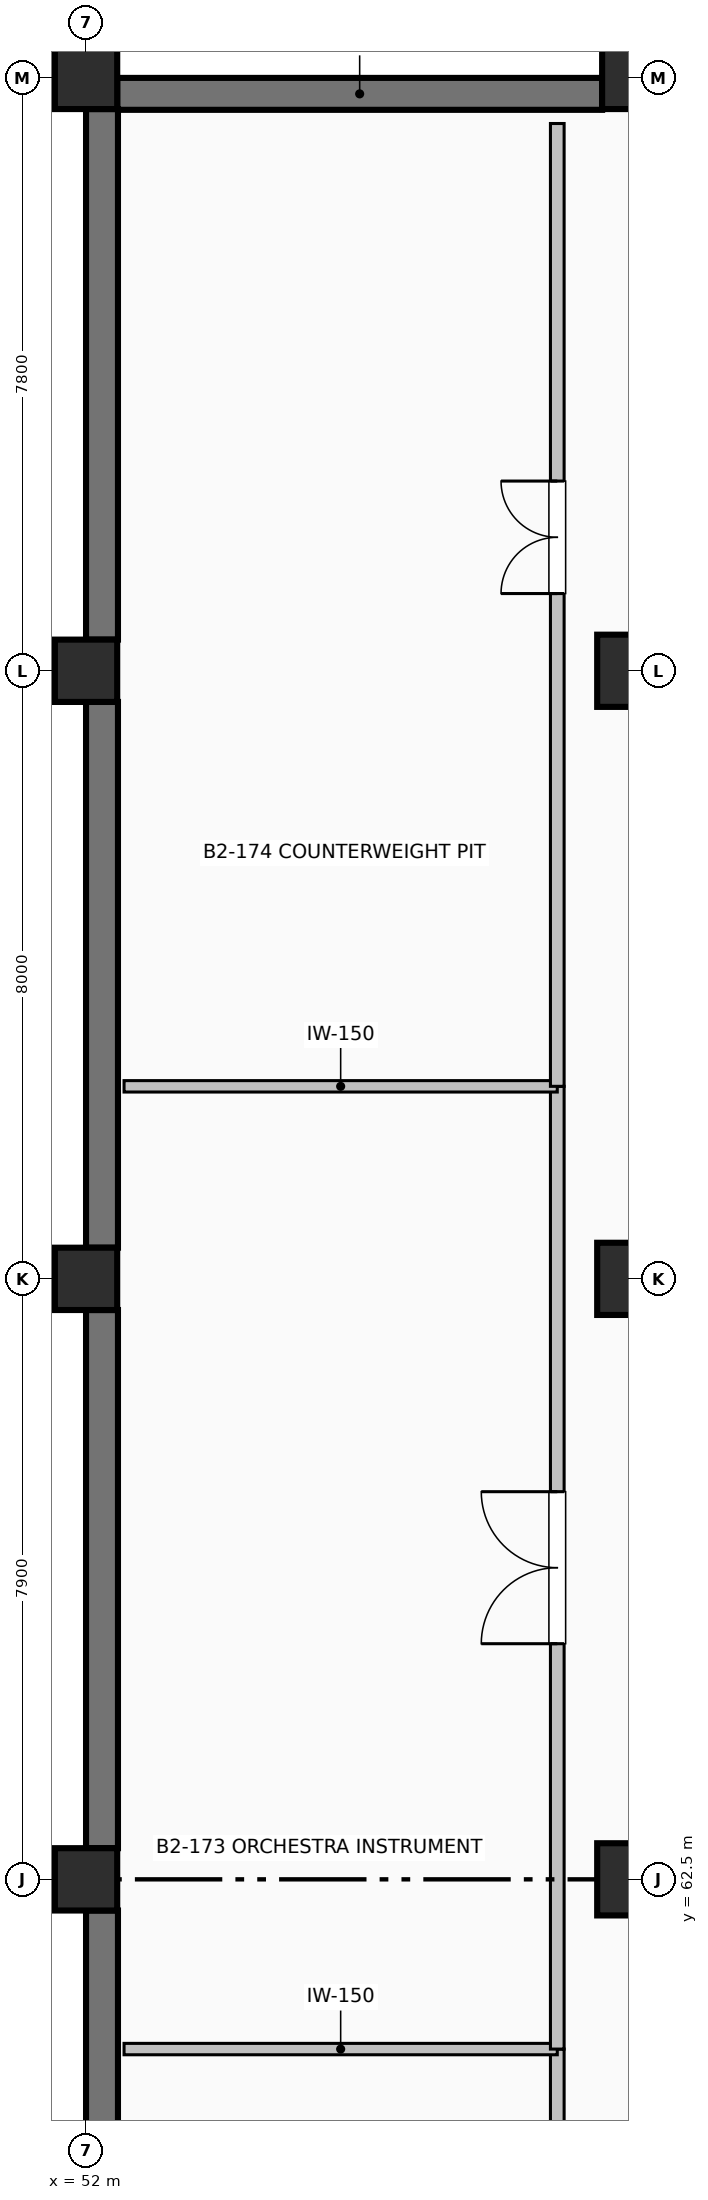
"""IFC4 building model, lengths in metres.
Left out: names, types, materials, properties, quantities, classifications, styles, units other than length and angle.
Written with IfcOpenShell. Run it as: python <this file> out.ifc"""

import sys

from ifc_helpers import new_model, si_unit, direction, frame, frame_2d, origin, origin_2d, place, context, subcontext, project, spatial, rectangle, extrude, element, fill, save


model = new_model("IFC4")
c1 = context("Model", 3, precision=1e-05, world=origin(), true_north=direction((0.0, 1.0)))
c2 = subcontext(c1, "Body", "Model", "MODEL_VIEW")
j1 = project(units=[si_unit("LENGTHUNIT", "METRE"), si_unit("PLANEANGLEUNIT", "RADIAN")], contexts=[c1])
p1 = place(None, origin())
s1 = spatial("IfcSite", under=j1, at=p1, CompositionType="ELEMENT")
p2 = place(p1, origin())
s2 = spatial("IfcBuilding", under=s1, at=p2, CompositionType="ELEMENT")
p3 = place(p2, frame((0.0, 0.0, -9.6)))
s3 = spatial("IfcBuildingStorey", under=s2, at=p3, CompositionType="ELEMENT", Elevation=-9.6)
for number, where, z_axis, x_axis in (
    (1, (52.0, 62.5, 0.0), (0.0, 0.0, 1.0), (1.0, 0.0, 0.0)),
    (2, (52.0, 70.4, 0.0), (0.0, 0.0, 1.0), (1.0, 0.0, 0.0)),
    (3, (52.0, 78.4, 0.0), (0.0, 0.0, 1.0), (1.0, 0.0, 0.0)),
    (4, (52.0, 86.2, 0.0), (0.0, 0.0, 1.0), (1.0, 0.0, 0.0)),
):
    element("IfcColumn", number, at=place(p3, frame(where, z_axis=z_axis, x_axis=x_axis)), inside=s3, PredefinedType="COLUMN", context=c2, shape_type="SweptSolid", body=[
        extrude(rectangle(XDim=0.82, YDim=0.82, at=origin_2d()), origin(), (0.0, 0.0, 1.0), 4.8),
    ])
for number, where, z_axis, x_axis in (
    (5, (59.2, 62.5, 0.0), (0.0, 0.0, 1.0), (1.0, 0.0, 0.0)),
    (6, (59.2, 70.4, 0.0), (0.0, 0.0, 1.0), (1.0, 0.0, 0.0)),
    (7, (59.2, 78.4, 0.0), (0.0, 0.0, 1.0), (1.0, 0.0, 0.0)),
):
    element("IfcColumn", number, at=place(p3, frame(where, z_axis=z_axis, x_axis=x_axis)), inside=s3, PredefinedType="COLUMN", context=c2, shape_type="SweptSolid", body=[
        extrude(rectangle(XDim=0.95, YDim=0.95, at=origin_2d()), origin(), (0.0, 0.0, 1.0), 4.8),
    ])
p4 = place(p3, frame((59.2, 86.2, 0.0), z_axis=(0.0, 0.0, 1.0), x_axis=(1.0, 0.0, 0.0)))
e8 = element("IfcColumn", 8, at=p4, inside=s3, PredefinedType="COLUMN", context=c2, shape_type="SweptSolid", body=[
    extrude(rectangle(XDim=0.82, YDim=0.82, at=origin_2d()), origin(), (0.0, 0.0, 1.0), 4.8),
])
p5 = place(p3, frame((52.41, 85.99, 0.0), z_axis=(0.0, 0.0, 1.0), x_axis=(1.0, 0.0, 0.0)))
e9 = element("IfcWall", 9, at=p5, inside=s3, PredefinedType="SHEAR", context=c2, shape_type="SweptSolid", body=[
    extrude(rectangle(XDim=6.38, YDim=0.42, at=frame_2d((3.19, 0.0))), origin(), (0.0, 0.0, 1.0), 4.5),
])
for number, where, z_axis, x_axis in (
    (10, (52.21, 55.01, 0.0), (0.0, 0.0, 1.0), (0.0, 1.0, 0.0)),
    (11, (52.21, 62.91, 0.0), (0.0, 0.0, 1.0), (0.0, 1.0, 0.0)),
):
    element("IfcWall", number, at=place(p3, frame(where, z_axis=z_axis, x_axis=x_axis)), inside=s3, PredefinedType="SHEAR", context=c2, shape_type="SweptSolid", body=[
        extrude(rectangle(XDim=7.08, YDim=0.42, at=frame_2d((3.54, 0.0))), origin(), (0.0, 0.0, 1.0), 4.5),
    ])
p6 = place(p3, frame((52.21, 70.81, 0.0), z_axis=(0.0, 0.0, 1.0), x_axis=(0.0, 1.0, 0.0)))
e12 = element("IfcWall", 12, at=p6, inside=s3, PredefinedType="SHEAR", context=c2, shape_type="SweptSolid", body=[
    extrude(rectangle(XDim=7.18, YDim=0.42, at=frame_2d((3.59, 0.0))), origin(), (0.0, 0.0, 1.0), 4.5),
])
p7 = place(p3, frame((52.21, 78.81, 0.0), z_axis=(0.0, 0.0, 1.0), x_axis=(0.0, 1.0, 0.0)))
e13 = element("IfcWall", 13, at=p7, inside=s3, PredefinedType="SHEAR", context=c2, shape_type="SweptSolid", body=[
    extrude(rectangle(XDim=6.98, YDim=0.42, at=frame_2d((3.49, 0.0))), origin(), (0.0, 0.0, 1.0), 4.5),
])
p8 = place(p3, frame((58.2, 47.6, 0.0), z_axis=(0.0, 0.0, 1.0), x_axis=(0.0, 1.0, 0.0)))
e14 = element("IfcWall", 14, at=p8, inside=s3, PredefinedType="PARTITIONING", context=c2, shape_type="SweptSolid", body=[
    extrude(rectangle(XDim=12.667, YDim=0.18, at=frame_2d((6.333, 0.0))), origin(), (0.0, 0.0, 1.0), 4.492),
])
p9 = place(p8, frame((4.633, 0.0, 0.0)))
e15 = element("IfcOpeningElement", 15, at=p9, cuts=e14, PredefinedType="OPENING", context=c2, shape_type="SweptSolid", body=[
    extrude(rectangle(XDim=1.65, YDim=2.2, at=frame_2d((0.825, 1.1))), frame((0.0, 0.1, 0.0), z_axis=(0.0, -1.0, 0.0), x_axis=(1.0, 0.0, 0.0)), (0.0, 0.0, 1.0), 0.2),
])
p10 = place(p3, frame((52.5, 60.267, 0.0), z_axis=(0.0, 0.0, 1.0), x_axis=(1.0, 0.0, 0.0)))
e16 = element("IfcWall", 16, at=p10, inside=s3, PredefinedType="PARTITIONING", context=c2, shape_type="SweptSolid", body=[
    extrude(rectangle(XDim=5.7, YDim=0.15, at=frame_2d((2.85, 0.0))), origin(), (0.0, 0.0, 1.0), 4.492),
])
p11 = place(p3, frame((58.2, 60.267, 0.0), z_axis=(0.0, 0.0, 1.0), x_axis=(0.0, 1.0, 0.0)))
e17 = element("IfcWall", 17, at=p11, inside=s3, PredefinedType="PARTITIONING", context=c2, shape_type="SweptSolid", body=[
    extrude(rectangle(XDim=12.666, YDim=0.18, at=frame_2d((6.333, 0.0))), origin(), (0.0, 0.0, 1.0), 4.492),
])
p12 = place(p11, frame((5.333, 0.0, 0.0)))
e18 = element("IfcOpeningElement", 18, at=p12, cuts=e17, PredefinedType="OPENING", context=c2, shape_type="SweptSolid", body=[
    extrude(rectangle(XDim=2.0, YDim=2.28, at=frame_2d((1.0, 1.14))), frame((0.0, 0.1, 0.0), z_axis=(0.0, -1.0, 0.0), x_axis=(1.0, 0.0, 0.0)), (0.0, 0.0, 1.0), 0.2),
])
p13 = place(p3, frame((52.5, 72.933, 0.0), z_axis=(0.0, 0.0, 1.0), x_axis=(1.0, 0.0, 0.0)))
e19 = element("IfcWall", 19, at=p13, inside=s3, PredefinedType="PARTITIONING", context=c2, shape_type="SweptSolid", body=[
    extrude(rectangle(XDim=5.7, YDim=0.15, at=frame_2d((2.85, 0.0))), origin(), (0.0, 0.0, 1.0), 4.492),
])
p14 = place(p3, frame((58.2, 72.933, 0.0), z_axis=(0.0, 0.0, 1.0), x_axis=(0.0, 1.0, 0.0)))
e20 = element("IfcWall", 20, at=p14, inside=s3, PredefinedType="PARTITIONING", context=c2, shape_type="SweptSolid", body=[
    extrude(rectangle(XDim=12.667, YDim=0.18, at=frame_2d((6.333, 0.0))), origin(), (0.0, 0.0, 1.0), 4.492),
])
p15 = place(p14, frame((6.483, 0.0, 0.0)))
e21 = element("IfcOpeningElement", 21, at=p15, cuts=e20, PredefinedType="OPENING", context=c2, shape_type="SweptSolid", body=[
    extrude(rectangle(XDim=1.48, YDim=2.18, at=frame_2d((0.74, 1.09))), frame((0.0, 0.1, 0.0), z_axis=(0.0, -1.0, 0.0), x_axis=(1.0, 0.0, 0.0)), (0.0, 0.0, 1.0), 0.2),
])
p16 = place(p12, origin())
e22 = element("IfcDoor", 22, at=p16, inside=s3, OperationType="DOUBLE_DOOR_SINGLE_SWING", PredefinedType="DOOR", context=c2, shape_type="SweptSolid", body=[
    extrude(rectangle(XDim=2.0, YDim=2.28, at=frame_2d((1.0, 1.14))), frame((0.0, 0.025, 0.0), z_axis=(0.0, -1.0, 0.0), x_axis=(1.0, 0.0, 0.0)), (0.0, 0.0, 1.0), 0.05),
])
fill(e18, e22)
p17 = place(p15, origin())
e23 = element("IfcDoor", 23, at=p17, inside=s3, OperationType="DOUBLE_DOOR_SINGLE_SWING", PredefinedType="DOOR", context=c2, shape_type="SweptSolid", body=[
    extrude(rectangle(XDim=1.48, YDim=2.18, at=frame_2d((0.74, 1.09))), frame((0.0, 0.025, 0.0), z_axis=(0.0, -1.0, 0.0), x_axis=(1.0, 0.0, 0.0)), (0.0, 0.0, 1.0), 0.05),
])
fill(e21, e23)
save(model, sys.argv[1])
